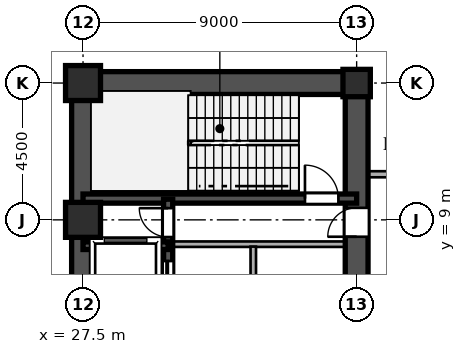
"""IFC4 building model, lengths in metres.
Left out: names, types, materials, properties, quantities, classifications, styles, units other than length and angle.
Written with IfcOpenShell. Run it as: python <this file> out.ifc"""

import sys

from ifc_helpers import new_model, si_unit, direction, frame, frame_2d, origin, origin_2d, place, context, subcontext, project, spatial, rectangle, hollow_rectangle, i_section, extrude, source, transform, mapped, element, fill, save


model = new_model("IFC4")
c1 = context("Model", 3, precision=1e-05, world=origin(), true_north=direction((0.0, 1.0)))
c2 = subcontext(c1, "Body", "Model", "MODEL_VIEW")
j1 = project(units=[si_unit("LENGTHUNIT", "METRE"), si_unit("PLANEANGLEUNIT", "RADIAN")], contexts=[c1])
p1 = place(None, origin())
s1 = spatial("IfcSite", under=j1, at=p1, CompositionType="ELEMENT")
p2 = place(p1, origin())
s2 = spatial("IfcBuilding", under=s1, at=p2, CompositionType="ELEMENT")
p3 = place(p2, frame((0.0, 0.0, -4.8)))
s3 = spatial("IfcBuildingStorey", under=s2, at=p3, CompositionType="ELEMENT", Elevation=-4.8)
m1 = source(origin(), c2, "Body", "SweptSolid", [
    extrude(hollow_rectangle(XDim=1.15, YDim=1.15, WallThickness=0.048, at=origin_2d()), origin(), (0.0, 0.0, 1.0), 4.8),
])
for number, where, z_axis, x_axis in (
    (1, (27.5, 9.0, 0.0), (0.0, 0.0, 1.0), (1.0, 0.0, 0.0)),
    (2, (27.5, 13.5, 0.0), (0.0, 0.0, 1.0), (1.0, 0.0, 0.0)),
):
    element("IfcColumn", number, at=place(p3, frame(where, z_axis=z_axis, x_axis=x_axis)), inside=s3, PredefinedType="COLUMN", context=c2, shape_type="MappedRepresentation", body=[
        mapped(m1, transform((0.0, 0.0, 0.0), scale=1.0)),
    ])
m2 = source(origin(), c2, "Body", "SweptSolid", [
    extrude(i_section(OverallWidth=0.9, OverallDepth=0.9, WebThickness=0.036, FlangeThickness=0.055, at=origin_2d()), origin(), (0.0, 0.0, 1.0), 4.8),
])
p4 = place(p3, frame((36.5, 13.5, 0.0), z_axis=(0.0, 0.0, 1.0), x_axis=(1.0, 0.0, 0.0)))
e3 = element("IfcColumn", 3, at=p4, inside=s3, PredefinedType="COLUMN", context=c2, shape_type="MappedRepresentation", body=[
    mapped(m2, transform((0.0, 0.0, 0.0), scale=1.0)),
])
p5 = place(p3, frame((27.5, 1.3, 0.0), z_axis=(0.0, 0.0, 1.0), x_axis=(0.0, 1.0, 0.0)))
e4 = element("IfcWall", 4, at=p5, inside=s3, PredefinedType="SHEAR", context=c2, shape_type="SweptSolid", body=[
    extrude(rectangle(XDim=12.2, YDim=0.75, at=frame_2d((6.1, 0.0))), origin(), (0.0, 0.0, 1.0), 4.52),
])
p6 = place(p3, frame((27.5, 13.5, 0.0), z_axis=(0.0, 0.0, 1.0), x_axis=(1.0, 0.0, 0.0)))
e5 = element("IfcWall", 5, at=p6, inside=s3, PredefinedType="SHEAR", context=c2, shape_type="SweptSolid", body=[
    extrude(rectangle(XDim=9.0, YDim=0.75, at=frame_2d((4.5, 0.0))), origin(), (0.0, 0.0, 1.0), 4.52),
])
p7 = place(p3, frame((36.5, 8.2, 0.0), z_axis=(0.0, 0.0, 1.0), x_axis=(0.0, 1.0, 0.0)))
e6 = element("IfcWall", 6, at=p7, inside=s3, PredefinedType="SHEAR", context=c2, shape_type="SweptSolid", body=[
    extrude(rectangle(XDim=5.45, YDim=0.75, at=frame_2d((2.725, 0.0))), origin(), (0.0, 0.0, 1.0), 4.52),
])
p8 = place(p7, frame((0.245, 0.0, 0.0)))
e7 = element("IfcOpeningElement", 7, at=p8, cuts=e6, PredefinedType="OPENING", context=c2, shape_type="SweptSolid", body=[
    extrude(rectangle(XDim=0.95, YDim=2.15, at=frame_2d((0.475, 1.075))), frame((0.0, 0.385, 0.0), z_axis=(0.0, -1.0, 0.0), x_axis=(1.0, 0.0, 0.0)), (0.0, 0.0, 1.0), 0.77),
])
p9 = place(p3, frame((36.5, 1.3, 0.0), z_axis=(0.0, 0.0, 1.0), x_axis=(0.0, 1.0, 0.0)))
e8 = element("IfcWall", 8, at=p9, inside=s3, PredefinedType="SHEAR", context=c2, shape_type="SweptSolid", body=[
    extrude(rectangle(XDim=6.9, YDim=0.75, at=frame_2d((3.45, 0.0))), origin(), (0.0, 0.0, 1.0), 4.52),
])
p10 = place(p9, frame((2.975, 0.0, 0.0)))
e9 = element("IfcOpeningElement", 9, at=p10, cuts=e8, PredefinedType="OPENING", context=c2, shape_type="SweptSolid", body=[
    extrude(rectangle(XDim=0.95, YDim=2.15, at=frame_2d((0.475, 1.075))), frame((0.0, 0.385, 0.0), z_axis=(0.0, -1.0, 0.0), x_axis=(1.0, 0.0, 0.0)), (0.0, 0.0, 1.0), 0.77),
])
p11 = place(p3, frame((27.5, 9.7, 0.0), z_axis=(0.0, 0.0, 1.0), x_axis=(1.0, 0.0, 0.0)))
e10 = element("IfcWall", 10, at=p11, inside=s3, PredefinedType="SHEAR", context=c2, shape_type="SweptSolid", body=[
    extrude(rectangle(XDim=9.0, YDim=0.3, at=frame_2d((4.5, 0.0))), origin(), (0.0, 0.0, 1.0), 4.52),
])
p12 = place(p11, frame((7.3, 0.0, 0.0)))
e11 = element("IfcOpeningElement", 11, at=p12, cuts=e10, PredefinedType="OPENING", context=c2, shape_type="SweptSolid", body=[
    extrude(rectangle(XDim=1.1, YDim=2.2, at=frame_2d((0.55, 1.1))), frame((0.0, 0.16, 0.0), z_axis=(0.0, -1.0, 0.0), x_axis=(1.0, 0.0, 0.0)), (0.0, 0.0, 1.0), 0.32),
])
p13 = place(p3, frame((27.5, 8.15, 0.0), z_axis=(0.0, 0.0, 1.0), x_axis=(1.0, 0.0, 0.0)))
e12 = element("IfcWall", 12, at=p13, inside=s3, PredefinedType="SHEAR", context=c2, shape_type="SweptSolid", body=[
    extrude(rectangle(XDim=2.8, YDim=0.25, at=frame_2d((1.4, 0.0))), origin(), (0.0, 0.0, 1.0), 4.52),
])
p14 = place(p3, frame((30.3, 5.9, 0.0), z_axis=(0.0, 0.0, 1.0), x_axis=(0.0, 1.0, 0.0)))
e13 = element("IfcWall", 13, at=p14, inside=s3, PredefinedType="SHEAR", context=c2, shape_type="SweptSolid", body=[
    extrude(rectangle(XDim=2.25, YDim=0.3, at=frame_2d((1.125, 0.0))), origin(), (0.0, 0.0, 1.0), 4.52),
])
p15 = place(p14, frame((0.495, 0.0, 0.0)))
e14 = element("IfcOpeningElement", 14, at=p15, cuts=e13, PredefinedType="OPENING", context=c2, shape_type="SweptSolid", body=[
    extrude(rectangle(XDim=1.25, YDim=2.3, at=frame_2d((0.625, 1.15))), frame((0.0, 0.16, 0.0), z_axis=(0.0, -1.0, 0.0), x_axis=(1.0, 0.0, 0.0)), (0.0, 0.0, 1.0), 0.32),
])
p16 = place(p3, frame((30.3, 8.15, 0.0), z_axis=(0.0, 0.0, 1.0), x_axis=(0.0, 1.0, 0.0)))
e15 = element("IfcWall", 15, at=p16, inside=s3, PredefinedType="SHEAR", context=c2, shape_type="SweptSolid", body=[
    extrude(rectangle(XDim=1.53, YDim=0.3, at=frame_2d((0.765, 0.0))), origin(), (0.0, 0.0, 1.0), 4.52),
])
p17 = place(p16, frame((0.285, 0.0, 0.0)))
e16 = element("IfcOpeningElement", 16, at=p17, cuts=e15, PredefinedType="OPENING", context=c2, shape_type="SweptSolid", body=[
    extrude(rectangle(XDim=0.95, YDim=2.15, at=frame_2d((0.475, 1.075))), frame((0.0, 0.16, 0.0), z_axis=(0.0, -1.0, 0.0), x_axis=(1.0, 0.0, 0.0)), (0.0, 0.0, 1.0), 0.32),
])
p18 = place(p3, frame((30.45, 8.2, 0.0), z_axis=(0.0, 0.0, 1.0), x_axis=(1.0, 0.0, 0.0)))
e17 = element("IfcWall", 17, at=p18, inside=s3, PredefinedType="PARTITIONING", context=c2, shape_type="SweptSolid", body=[
    extrude(rectangle(XDim=5.7, YDim=0.18, at=frame_2d((2.85, 0.0))), origin(), (0.0, 0.0, 1.0), 4.52),
])
p19 = place(p3, frame((33.1, 1.38, 0.0), z_axis=(0.0, 0.0, 1.0), x_axis=(0.0, 1.0, 0.0)))
e18 = element("IfcWall", 18, at=p19, inside=s3, PredefinedType="PARTITIONING", context=c2, shape_type="SweptSolid", body=[
    extrude(rectangle(XDim=6.74, YDim=0.18, at=frame_2d((3.37, 0.0))), origin(), (0.0, 0.0, 1.0), 4.52),
])
p20 = place(p3, frame((36.88, 10.5, 0.0), z_axis=(0.0, 0.0, 1.0), x_axis=(1.0, 0.0, 0.0)))
e19 = element("IfcWall", 19, at=p20, inside=s3, PredefinedType="PARTITIONING", context=c2, shape_type="SweptSolid", body=[
    extrude(rectangle(XDim=2.035, YDim=0.2, at=frame_2d((1.018, 0.0))), origin(), (0.0, 0.0, 1.0), 4.52),
])
m3 = source(origin(), c2, "Body", "SweptSolid", [
    extrude(rectangle(XDim=0.95, YDim=2.15, at=frame_2d((0.475, 1.075))), frame((0.0, 0.025, 0.0), z_axis=(0.0, -1.0, 0.0), x_axis=(1.0, 0.0, 0.0)), (0.0, 0.0, 1.0), 0.05),
])
p21 = place(p8, origin())
e20 = element("IfcDoor", 20, at=p21, inside=s3, OperationType="SINGLE_SWING_LEFT", PredefinedType="DOOR", context=c2, shape_type="MappedRepresentation", body=[
    mapped(m3, transform((0.0, 0.0, 0.0), scale=1.0)),
])
fill(e7, e20)
m4 = source(origin(), c2, "Body", "SweptSolid", [
    extrude(rectangle(XDim=1.1, YDim=2.2, at=frame_2d((0.55, 1.1))), frame((0.0, 0.025, 0.0), z_axis=(0.0, -1.0, 0.0), x_axis=(1.0, 0.0, 0.0)), (0.0, 0.0, 1.0), 0.05),
])
p22 = place(p12, origin())
e21 = element("IfcDoor", 21, at=p22, inside=s3, OperationType="SINGLE_SWING_LEFT", PredefinedType="DOOR", context=c2, shape_type="MappedRepresentation", body=[
    mapped(m4, transform((0.0, 0.0, 0.0), scale=1.0)),
])
fill(e11, e21)
m5 = source(origin(), c2, "Body", "SweptSolid", [
    extrude(rectangle(XDim=1.25, YDim=2.3, at=frame_2d((0.625, 1.15))), frame((0.0, 0.025, 0.0), z_axis=(0.0, -1.0, 0.0), x_axis=(1.0, 0.0, 0.0)), (0.0, 0.0, 1.0), 0.05),
])
p23 = place(p15, origin())
e22 = element("IfcDoor", 22, at=p23, inside=s3, OperationType="DOUBLE_DOOR_SLIDING", PredefinedType="DOOR", context=c2, shape_type="MappedRepresentation", body=[
    mapped(m5, transform((0.0, 0.0, 0.0), scale=1.0)),
])
fill(e14, e22)
p24 = place(p17, origin())
e23 = element("IfcDoor", 23, at=p24, inside=s3, OperationType="SINGLE_SWING_RIGHT", PredefinedType="DOOR", context=c2, shape_type="MappedRepresentation", body=[
    mapped(m3, transform((0.0, 0.0, 0.0), scale=1.0)),
])
fill(e16, e23)
save(model, sys.argv[1])
